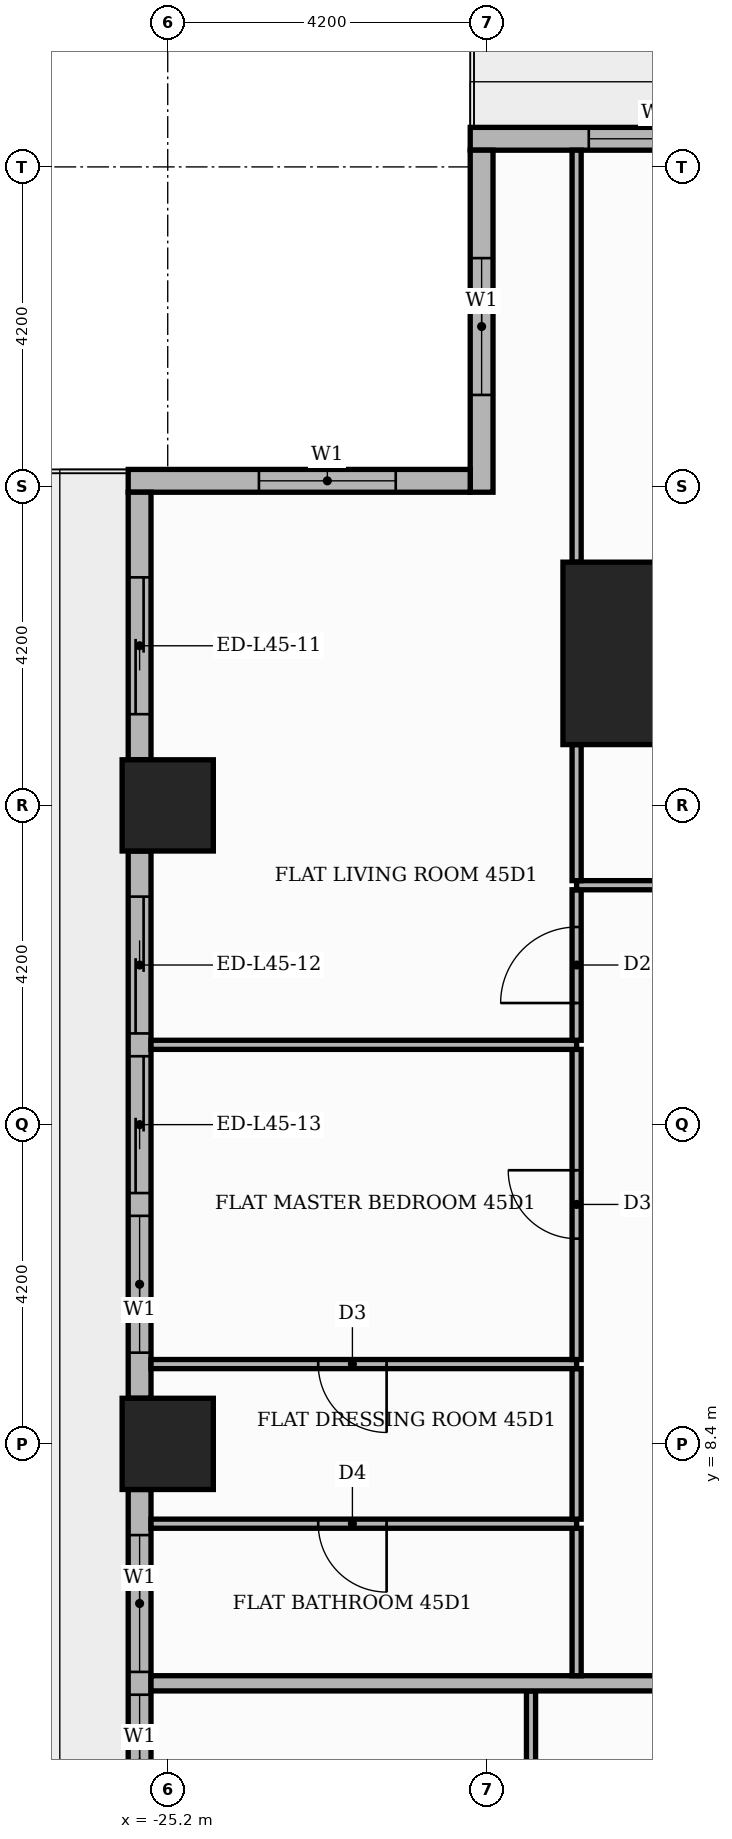
"""IFC4 building model, lengths in metres.
Left out: names, types, materials, properties, quantities, classifications, styles, units other than length and angle.
Written with IfcOpenShell. Run it as: python <this file> out.ifc"""

import sys

from ifc_helpers import new_model, si_unit, direction, frame, frame_2d, origin, origin_2d, place, context, subcontext, project, spatial, rectangle, extrude, element, fill, save


model = new_model("IFC4")
c1 = context("Model", 3, precision=1e-05, world=origin(), true_north=direction((0.0, 1.0)))
c2 = subcontext(c1, "Body", "Model", "MODEL_VIEW")
j1 = project(units=[si_unit("LENGTHUNIT", "METRE"), si_unit("PLANEANGLEUNIT", "RADIAN")], contexts=[c1])
p1 = place(None, origin())
s1 = spatial("IfcSite", under=j1, at=p1, CompositionType="ELEMENT")
p2 = place(p1, origin())
s2 = spatial("IfcBuilding", under=s1, at=p2, CompositionType="ELEMENT")
p3 = place(p2, frame((0.0, 0.0, 192.3)))
s3 = spatial("IfcBuildingStorey", under=s2, at=p3, CompositionType="ELEMENT", Elevation=192.3)
p4 = place(p3, frame((-18.8, 18.8, 0.0), z_axis=(0.0, 0.0, 1.0), x_axis=(1.0, 0.0, 0.0)))
e1 = element("IfcColumn", 1, at=p4, inside=s3, PredefinedType="COLUMN", context=c2, shape_type="SweptSolid", body=[
    extrude(rectangle(XDim=2.4, YDim=2.4, at=origin_2d()), origin(), (0.0, 0.0, 1.0), 3.9),
])
for number, where, z_axis, x_axis in (
    (2, (-25.2, 8.4, 0.0), (0.0, 0.0, 1.0), (1.0, 0.0, 0.0)),
    (3, (-25.2, 16.8, 0.0), (0.0, 0.0, 1.0), (1.0, 0.0, 0.0)),
):
    element("IfcColumn", number, at=place(p3, frame(where, z_axis=z_axis, x_axis=x_axis)), inside=s3, PredefinedType="COLUMN", context=c2, shape_type="SweptSolid", body=[
        extrude(rectangle(XDim=1.2, YDim=1.2, at=origin_2d()), origin(), (0.0, 0.0, 1.0), 3.9),
    ])
p5 = place(p3, frame((-17.4, 25.57, 0.0), z_axis=(0.0, 0.0, 1.0), x_axis=(-1.0, 0.0, 0.0)))
e4 = element("IfcWall", 4, at=p5, inside=s3, PredefinedType="STANDARD", context=c2, shape_type="SweptSolid", body=[
    extrude(rectangle(XDim=3.82, YDim=0.3, at=frame_2d((1.91, 0.0))), origin(), (0.0, 0.0, 1.0), 3.48),
])
p6 = place(p5, frame((0.46, 0.0, 0.9)))
e5 = element("IfcOpeningElement", 5, at=p6, cuts=e4, PredefinedType="OPENING", context=c2, shape_type="SweptSolid", body=[
    extrude(rectangle(XDim=1.8, YDim=2.1, at=frame_2d((0.9, 1.05))), frame((0.0, 0.16, 0.0), z_axis=(0.0, -1.0, 0.0), x_axis=(1.0, 0.0, 0.0)), (0.0, 0.0, 1.0), 0.32),
])
p7 = place(p3, frame((-21.07, 25.42, 0.0), z_axis=(0.0, 0.0, 1.0), x_axis=(0.0, -1.0, 0.0)))
e6 = element("IfcWall", 6, at=p7, inside=s3, PredefinedType="STANDARD", context=c2, shape_type="SweptSolid", body=[
    extrude(rectangle(XDim=4.5, YDim=0.3, at=frame_2d((2.25, 0.0))), origin(), (0.0, 0.0, 1.0), 3.48),
])
p8 = place(p7, frame((1.42, 0.0, 0.9)))
e7 = element("IfcOpeningElement", 7, at=p8, cuts=e6, PredefinedType="OPENING", context=c2, shape_type="SweptSolid", body=[
    extrude(rectangle(XDim=1.8, YDim=2.1, at=frame_2d((0.9, 1.05))), frame((0.0, 0.16, 0.0), z_axis=(0.0, -1.0, 0.0), x_axis=(1.0, 0.0, 0.0)), (0.0, 0.0, 1.0), 0.32),
])
p9 = place(p3, frame((-21.22, 21.07, 0.0), z_axis=(0.0, 0.0, 1.0), x_axis=(-1.0, 0.0, 0.0)))
e8 = element("IfcWall", 8, at=p9, inside=s3, PredefinedType="STANDARD", context=c2, shape_type="SweptSolid", body=[
    extrude(rectangle(XDim=4.5, YDim=0.3, at=frame_2d((2.25, 0.0))), origin(), (0.0, 0.0, 1.0), 3.48),
])
p10 = place(p9, frame((0.98, 0.0, 0.9)))
e9 = element("IfcOpeningElement", 9, at=p10, cuts=e8, PredefinedType="OPENING", context=c2, shape_type="SweptSolid", body=[
    extrude(rectangle(XDim=1.8, YDim=2.1, at=frame_2d((0.9, 1.05))), frame((0.0, 0.16, 0.0), z_axis=(0.0, -1.0, 0.0), x_axis=(1.0, 0.0, 0.0)), (0.0, 0.0, 1.0), 0.32),
])
p11 = place(p3, frame((-25.57, 20.92, 0.0), z_axis=(0.0, 0.0, 1.0), x_axis=(0.0, -1.0, 0.0)))
e10 = element("IfcWall", 10, at=p11, inside=s3, PredefinedType="STANDARD", context=c2, shape_type="SweptSolid", body=[
    extrude(rectangle(XDim=3.52, YDim=0.3, at=frame_2d((1.76, 0.0))), origin(), (0.0, 0.0, 1.0), 3.48),
])
p12 = place(p11, frame((1.12, 0.0, 0.0)))
e11 = element("IfcOpeningElement", 11, at=p12, cuts=e10, PredefinedType="OPENING", context=c2, shape_type="SweptSolid", body=[
    extrude(rectangle(XDim=1.8, YDim=2.4, at=frame_2d((0.9, 1.2))), frame((0.0, 0.16, 0.0), z_axis=(0.0, -1.0, 0.0), x_axis=(1.0, 0.0, 0.0)), (0.0, 0.0, 1.0), 0.32),
])
p13 = place(p3, frame((-25.57, 16.2, 0.0), z_axis=(0.0, 0.0, 1.0), x_axis=(0.0, -1.0, 0.0)))
e12 = element("IfcWall", 12, at=p13, inside=s3, PredefinedType="STANDARD", context=c2, shape_type="SweptSolid", body=[
    extrude(rectangle(XDim=7.2, YDim=0.3, at=frame_2d((3.6, 0.0))), origin(), (0.0, 0.0, 1.0), 3.48),
])
p14 = place(p13, frame((0.6, 0.0, 0.0)))
e13 = element("IfcOpeningElement", 13, at=p14, cuts=e12, PredefinedType="OPENING", context=c2, shape_type="SweptSolid", body=[
    extrude(rectangle(XDim=1.8, YDim=2.4, at=frame_2d((0.9, 1.2))), frame((0.0, 0.16, 0.0), z_axis=(0.0, -1.0, 0.0), x_axis=(1.0, 0.0, 0.0)), (0.0, 0.0, 1.0), 0.32),
])
p15 = place(p13, frame((2.7, 0.0, 0.0)))
e14 = element("IfcOpeningElement", 14, at=p15, cuts=e12, PredefinedType="OPENING", context=c2, shape_type="SweptSolid", body=[
    extrude(rectangle(XDim=1.8, YDim=2.4, at=frame_2d((0.9, 1.2))), frame((0.0, 0.16, 0.0), z_axis=(0.0, -1.0, 0.0), x_axis=(1.0, 0.0, 0.0)), (0.0, 0.0, 1.0), 0.32),
])
p16 = place(p13, frame((4.8, 0.0, 0.9)))
e15 = element("IfcOpeningElement", 15, at=p16, cuts=e12, PredefinedType="OPENING", context=c2, shape_type="SweptSolid", body=[
    extrude(rectangle(XDim=1.8, YDim=2.1, at=frame_2d((0.9, 1.05))), frame((0.0, 0.16, 0.0), z_axis=(0.0, -1.0, 0.0), x_axis=(1.0, 0.0, 0.0)), (0.0, 0.0, 1.0), 0.32),
])
p17 = place(p3, frame((-25.57, 7.8, 0.0), z_axis=(0.0, 0.0, 1.0), x_axis=(0.0, -1.0, 0.0)))
e16 = element("IfcWall", 16, at=p17, inside=s3, PredefinedType="STANDARD", context=c2, shape_type="SweptSolid", body=[
    extrude(rectangle(XDim=7.2, YDim=0.3, at=frame_2d((3.6, 0.0))), origin(), (0.0, 0.0, 1.0), 3.48),
])
p18 = place(p17, frame((0.6, 0.0, 0.9)))
e17 = element("IfcOpeningElement", 17, at=p18, cuts=e16, PredefinedType="OPENING", context=c2, shape_type="SweptSolid", body=[
    extrude(rectangle(XDim=1.8, YDim=2.1, at=frame_2d((0.9, 1.05))), frame((0.0, 0.16, 0.0), z_axis=(0.0, -1.0, 0.0), x_axis=(1.0, 0.0, 0.0)), (0.0, 0.0, 1.0), 0.32),
])
p19 = place(p17, frame((2.7, 0.0, 0.9)))
e18 = element("IfcOpeningElement", 18, at=p19, cuts=e16, PredefinedType="OPENING", context=c2, shape_type="SweptSolid", body=[
    extrude(rectangle(XDim=1.8, YDim=2.1, at=frame_2d((0.9, 1.05))), frame((0.0, 0.16, 0.0), z_axis=(0.0, -1.0, 0.0), x_axis=(1.0, 0.0, 0.0)), (0.0, 0.0, 1.0), 0.32),
])
p20 = place(p17, frame((4.8, 0.0, 0.0)))
e19 = element("IfcOpeningElement", 19, at=p20, cuts=e16, PredefinedType="OPENING", context=c2, shape_type="SweptSolid", body=[
    extrude(rectangle(XDim=1.8, YDim=2.4, at=frame_2d((0.9, 1.2))), frame((0.0, 0.16, 0.0), z_axis=(0.0, -1.0, 0.0), x_axis=(1.0, 0.0, 0.0)), (0.0, 0.0, 1.0), 0.32),
])
p21 = place(p3, frame((-20.42, 1.11, 0.0), z_axis=(0.0, 0.0, 1.0), x_axis=(0.0, 1.0, 0.0)))
e20 = element("IfcWall", 20, at=p21, inside=s3, PredefinedType="PARTITIONING", context=c2, shape_type="SweptSolid", body=[
    extrude(rectangle(XDim=4.04, YDim=0.12, at=frame_2d((2.02, 0.0))), origin(), (0.0, 0.0, 1.0), 3.48),
])
p22 = place(p21, frame((1.54, 0.0, 0.0)))
e21 = element("IfcOpeningElement", 21, at=p22, cuts=e20, PredefinedType="OPENING", context=c2, shape_type="SweptSolid", body=[
    extrude(rectangle(XDim=1.0, YDim=2.1, at=frame_2d((0.5, 1.05))), frame((0.0, 0.07, 0.0), z_axis=(0.0, -1.0, 0.0), x_axis=(1.0, 0.0, 0.0)), (0.0, 0.0, 1.0), 0.14),
])
p23 = place(p3, frame((-25.42, 5.25, 0.0), z_axis=(0.0, 0.0, 1.0), x_axis=(1.0, 0.0, 0.0)))
e22 = element("IfcWall", 22, at=p23, inside=s3, PredefinedType="PARTITIONING", context=c2, shape_type="SweptSolid", body=[
    extrude(rectangle(XDim=11.77, YDim=0.2, at=frame_2d((5.885, 0.0))), origin(), (0.0, 0.0, 1.0), 3.48),
])
p24 = place(p3, frame((-19.82, 5.35, 0.0), z_axis=(0.0, 0.0, 1.0), x_axis=(0.0, 1.0, 0.0)))
e23 = element("IfcWall", 23, at=p24, inside=s3, PredefinedType="PARTITIONING", context=c2, shape_type="SweptSolid", body=[
    extrude(rectangle(XDim=1.94, YDim=0.12, at=frame_2d((0.97, 0.0))), origin(), (0.0, 0.0, 1.0), 3.48),
])
p25 = place(p3, frame((-25.42, 7.35, 0.0), z_axis=(0.0, 0.0, 1.0), x_axis=(1.0, 0.0, 0.0)))
e24 = element("IfcWall", 24, at=p25, inside=s3, PredefinedType="PARTITIONING", context=c2, shape_type="SweptSolid", body=[
    extrude(rectangle(XDim=5.6, YDim=0.12, at=frame_2d((2.8, 0.0))), origin(), (0.0, 0.0, 1.0), 3.48),
])
p26 = place(p25, frame((2.2, 0.0, 0.0)))
e25 = element("IfcOpeningElement", 25, at=p26, cuts=e24, PredefinedType="OPENING", context=c2, shape_type="SweptSolid", body=[
    extrude(rectangle(XDim=0.9, YDim=2.1, at=frame_2d((0.45, 1.05))), frame((0.0, 0.07, 0.0), z_axis=(0.0, -1.0, 0.0), x_axis=(1.0, 0.0, 0.0)), (0.0, 0.0, 1.0), 0.14),
])
p27 = place(p3, frame((-19.82, 7.41, 0.0), z_axis=(0.0, 0.0, 1.0), x_axis=(0.0, 1.0, 0.0)))
e26 = element("IfcWall", 26, at=p27, inside=s3, PredefinedType="PARTITIONING", context=c2, shape_type="SweptSolid", body=[
    extrude(rectangle(XDim=1.98, YDim=0.12, at=frame_2d((0.99, 0.0))), origin(), (0.0, 0.0, 1.0), 3.48),
])
p28 = place(p3, frame((-25.42, 9.45, 0.0), z_axis=(0.0, 0.0, 1.0), x_axis=(1.0, 0.0, 0.0)))
e27 = element("IfcWall", 27, at=p28, inside=s3, PredefinedType="PARTITIONING", context=c2, shape_type="SweptSolid", body=[
    extrude(rectangle(XDim=5.6, YDim=0.12, at=frame_2d((2.8, 0.0))), origin(), (0.0, 0.0, 1.0), 3.48),
])
p29 = place(p28, frame((2.2, 0.0, 0.0)))
e28 = element("IfcOpeningElement", 28, at=p29, cuts=e27, PredefinedType="OPENING", context=c2, shape_type="SweptSolid", body=[
    extrude(rectangle(XDim=0.9, YDim=2.1, at=frame_2d((0.45, 1.05))), frame((0.0, 0.07, 0.0), z_axis=(0.0, -1.0, 0.0), x_axis=(1.0, 0.0, 0.0)), (0.0, 0.0, 1.0), 0.14),
])
p30 = place(p3, frame((-19.82, 9.51, 0.0), z_axis=(0.0, 0.0, 1.0), x_axis=(0.0, 1.0, 0.0)))
e29 = element("IfcWall", 29, at=p30, inside=s3, PredefinedType="PARTITIONING", context=c2, shape_type="SweptSolid", body=[
    extrude(rectangle(XDim=4.08, YDim=0.12, at=frame_2d((2.04, 0.0))), origin(), (0.0, 0.0, 1.0), 3.48),
])
p31 = place(p30, frame((1.59, 0.0, 0.0)))
e30 = element("IfcOpeningElement", 30, at=p31, cuts=e29, PredefinedType="OPENING", context=c2, shape_type="SweptSolid", body=[
    extrude(rectangle(XDim=0.9, YDim=2.1, at=frame_2d((0.45, 1.05))), frame((0.0, 0.07, 0.0), z_axis=(0.0, -1.0, 0.0), x_axis=(1.0, 0.0, 0.0)), (0.0, 0.0, 1.0), 0.14),
])
p32 = place(p3, frame((-25.42, 13.65, 0.0), z_axis=(0.0, 0.0, 1.0), x_axis=(1.0, 0.0, 0.0)))
e31 = element("IfcWall", 31, at=p32, inside=s3, PredefinedType="PARTITIONING", context=c2, shape_type="SweptSolid", body=[
    extrude(rectangle(XDim=5.6, YDim=0.12, at=frame_2d((2.8, 0.0))), origin(), (0.0, 0.0, 1.0), 3.48),
])
p33 = place(p3, frame((-19.82, 13.71, 0.0), z_axis=(0.0, 0.0, 1.0), x_axis=(0.0, 1.0, 0.0)))
e32 = element("IfcWall", 32, at=p33, inside=s3, PredefinedType="PARTITIONING", context=c2, shape_type="SweptSolid", body=[
    extrude(rectangle(XDim=1.98, YDim=0.12, at=frame_2d((0.99, 0.0))), origin(), (0.0, 0.0, 1.0), 3.48),
])
p34 = place(p33, frame((0.49, 0.0, 0.0)))
e33 = element("IfcOpeningElement", 33, at=p34, cuts=e32, PredefinedType="OPENING", context=c2, shape_type="SweptSolid", body=[
    extrude(rectangle(XDim=1.0, YDim=2.1, at=frame_2d((0.5, 1.05))), frame((0.0, 0.07, 0.0), z_axis=(0.0, -1.0, 0.0), x_axis=(1.0, 0.0, 0.0)), (0.0, 0.0, 1.0), 0.14),
])
p35 = place(p3, frame((-19.82, 15.75, 0.0), z_axis=(0.0, 0.0, 1.0), x_axis=(1.0, 0.0, 0.0)))
e34 = element("IfcWall", 34, at=p35, inside=s3, PredefinedType="PARTITIONING", context=c2, shape_type="SweptSolid", body=[
    extrude(rectangle(XDim=6.07, YDim=0.12, at=frame_2d((3.035, 0.0))), origin(), (0.0, 0.0, 1.0), 3.48),
])
p36 = place(p35, frame((2.585, 0.0, 0.0)))
e35 = element("IfcOpeningElement", 35, at=p36, cuts=e34, PredefinedType="OPENING", context=c2, shape_type="SweptSolid", body=[
    extrude(rectangle(XDim=1.0, YDim=2.1, at=frame_2d((0.5, 1.05))), frame((0.0, 0.07, 0.0), z_axis=(0.0, -1.0, 0.0), x_axis=(1.0, 0.0, 0.0)), (0.0, 0.0, 1.0), 0.14),
])
p37 = place(p3, frame((-19.82, 15.81, 0.0), z_axis=(0.0, 0.0, 1.0), x_axis=(0.0, 1.0, 0.0)))
e36 = element("IfcWall", 36, at=p37, inside=s3, PredefinedType="PARTITIONING", context=c2, shape_type="SweptSolid", body=[
    extrude(rectangle(XDim=1.79, YDim=0.12, at=frame_2d((0.895, 0.0))), origin(), (0.0, 0.0, 1.0), 3.48),
])
p38 = place(p3, frame((-19.82, 20.0, 0.0), z_axis=(0.0, 0.0, 1.0), x_axis=(0.0, 1.0, 0.0)))
e37 = element("IfcWall", 37, at=p38, inside=s3, PredefinedType="PARTITIONING", context=c2, shape_type="SweptSolid", body=[
    extrude(rectangle(XDim=5.42, YDim=0.12, at=frame_2d((2.71, 0.0))), origin(), (0.0, 0.0, 1.0), 3.48),
])
p39 = place(p6, origin())
e38 = element("IfcWindow", 38, at=p39, inside=s3, PartitioningType="SINGLE_PANEL", PredefinedType="WINDOW", context=c2, shape_type="SweptSolid", body=[
    extrude(rectangle(XDim=1.8, YDim=2.1, at=frame_2d((0.9, 1.05))), frame((0.0, 0.03, 0.0), z_axis=(0.0, -1.0, 0.0), x_axis=(1.0, 0.0, 0.0)), (0.0, 0.0, 1.0), 0.06),
])
fill(e5, e38)
p40 = place(p8, origin())
e39 = element("IfcWindow", 39, at=p40, inside=s3, PartitioningType="SINGLE_PANEL", PredefinedType="WINDOW", context=c2, shape_type="SweptSolid", body=[
    extrude(rectangle(XDim=1.8, YDim=2.1, at=frame_2d((0.9, 1.05))), frame((0.0, 0.03, 0.0), z_axis=(0.0, -1.0, 0.0), x_axis=(1.0, 0.0, 0.0)), (0.0, 0.0, 1.0), 0.06),
])
fill(e7, e39)
p41 = place(p10, origin())
e40 = element("IfcWindow", 40, at=p41, inside=s3, PartitioningType="SINGLE_PANEL", PredefinedType="WINDOW", context=c2, shape_type="SweptSolid", body=[
    extrude(rectangle(XDim=1.8, YDim=2.1, at=frame_2d((0.9, 1.05))), frame((0.0, 0.03, 0.0), z_axis=(0.0, -1.0, 0.0), x_axis=(1.0, 0.0, 0.0)), (0.0, 0.0, 1.0), 0.06),
])
fill(e9, e40)
p42 = place(p12, origin())
e41 = element("IfcDoor", 41, at=p42, inside=s3, OperationType="SLIDING_TO_RIGHT", PredefinedType="DOOR", context=c2, shape_type="SweptSolid", body=[
    extrude(rectangle(XDim=1.8, YDim=2.4, at=frame_2d((0.9, 1.2))), frame((0.0, 0.025, 0.0), z_axis=(0.0, -1.0, 0.0), x_axis=(1.0, 0.0, 0.0)), (0.0, 0.0, 1.0), 0.05),
])
fill(e11, e41)
p43 = place(p14, origin())
e42 = element("IfcDoor", 42, at=p43, inside=s3, OperationType="SLIDING_TO_LEFT", PredefinedType="DOOR", context=c2, shape_type="SweptSolid", body=[
    extrude(rectangle(XDim=1.8, YDim=2.4, at=frame_2d((0.9, 1.2))), frame((0.0, 0.025, 0.0), z_axis=(0.0, -1.0, 0.0), x_axis=(1.0, 0.0, 0.0)), (0.0, 0.0, 1.0), 0.05),
])
fill(e13, e42)
p44 = place(p15, origin())
e43 = element("IfcDoor", 43, at=p44, inside=s3, OperationType="SLIDING_TO_RIGHT", PredefinedType="DOOR", context=c2, shape_type="SweptSolid", body=[
    extrude(rectangle(XDim=1.8, YDim=2.4, at=frame_2d((0.9, 1.2))), frame((0.0, 0.025, 0.0), z_axis=(0.0, -1.0, 0.0), x_axis=(1.0, 0.0, 0.0)), (0.0, 0.0, 1.0), 0.05),
])
fill(e14, e43)
p45 = place(p16, origin())
e44 = element("IfcWindow", 44, at=p45, inside=s3, PartitioningType="SINGLE_PANEL", PredefinedType="WINDOW", context=c2, shape_type="SweptSolid", body=[
    extrude(rectangle(XDim=1.8, YDim=2.1, at=frame_2d((0.9, 1.05))), frame((0.0, 0.03, 0.0), z_axis=(0.0, -1.0, 0.0), x_axis=(1.0, 0.0, 0.0)), (0.0, 0.0, 1.0), 0.06),
])
fill(e15, e44)
p46 = place(p18, origin())
e45 = element("IfcWindow", 45, at=p46, inside=s3, PartitioningType="SINGLE_PANEL", PredefinedType="WINDOW", context=c2, shape_type="SweptSolid", body=[
    extrude(rectangle(XDim=1.8, YDim=2.1, at=frame_2d((0.9, 1.05))), frame((0.0, 0.03, 0.0), z_axis=(0.0, -1.0, 0.0), x_axis=(1.0, 0.0, 0.0)), (0.0, 0.0, 1.0), 0.06),
])
fill(e17, e45)
p47 = place(p19, origin())
e46 = element("IfcWindow", 46, at=p47, inside=s3, PartitioningType="SINGLE_PANEL", PredefinedType="WINDOW", context=c2, shape_type="SweptSolid", body=[
    extrude(rectangle(XDim=1.8, YDim=2.1, at=frame_2d((0.9, 1.05))), frame((0.0, 0.03, 0.0), z_axis=(0.0, -1.0, 0.0), x_axis=(1.0, 0.0, 0.0)), (0.0, 0.0, 1.0), 0.06),
])
fill(e18, e46)
p48 = place(p34, origin())
e47 = element("IfcDoor", 47, at=p48, inside=s3, OperationType="SINGLE_SWING_LEFT", PredefinedType="DOOR", context=c2, shape_type="SweptSolid", body=[
    extrude(rectangle(XDim=1.0, YDim=2.1, at=frame_2d((0.5, 1.05))), frame((0.0, 0.025, 0.0), z_axis=(0.0, -1.0, 0.0), x_axis=(1.0, 0.0, 0.0)), (0.0, 0.0, 1.0), 0.05),
])
fill(e33, e47)
p49 = place(p31, origin())
e48 = element("IfcDoor", 48, at=p49, inside=s3, OperationType="SINGLE_SWING_RIGHT", PredefinedType="DOOR", context=c2, shape_type="SweptSolid", body=[
    extrude(rectangle(XDim=0.9, YDim=2.1, at=frame_2d((0.45, 1.05))), frame((0.0, 0.025, 0.0), z_axis=(0.0, -1.0, 0.0), x_axis=(1.0, 0.0, 0.0)), (0.0, 0.0, 1.0), 0.05),
])
fill(e30, e48)
p50 = place(p29, frame((0.9, 0.0, 0.0), z_axis=(0.0, 0.0, 1.0), x_axis=(-1.0, 0.0, 0.0)))
e49 = element("IfcDoor", 49, at=p50, inside=s3, OperationType="SINGLE_SWING_RIGHT", PredefinedType="DOOR", context=c2, shape_type="SweptSolid", body=[
    extrude(rectangle(XDim=0.9, YDim=2.1, at=frame_2d((0.45, 1.05))), frame((0.0, 0.025, 0.0), z_axis=(0.0, -1.0, 0.0), x_axis=(1.0, 0.0, 0.0)), (0.0, 0.0, 1.0), 0.05),
])
fill(e28, e49)
p51 = place(p26, frame((0.9, 0.0, 0.0), z_axis=(0.0, 0.0, 1.0), x_axis=(-1.0, 0.0, 0.0)))
e50 = element("IfcDoor", 50, at=p51, inside=s3, OperationType="SINGLE_SWING_RIGHT", PredefinedType="DOOR", context=c2, shape_type="SweptSolid", body=[
    extrude(rectangle(XDim=0.9, YDim=2.1, at=frame_2d((0.45, 1.05))), frame((0.0, 0.025, 0.0), z_axis=(0.0, -1.0, 0.0), x_axis=(1.0, 0.0, 0.0)), (0.0, 0.0, 1.0), 0.05),
])
fill(e25, e50)
save(model, sys.argv[1])
